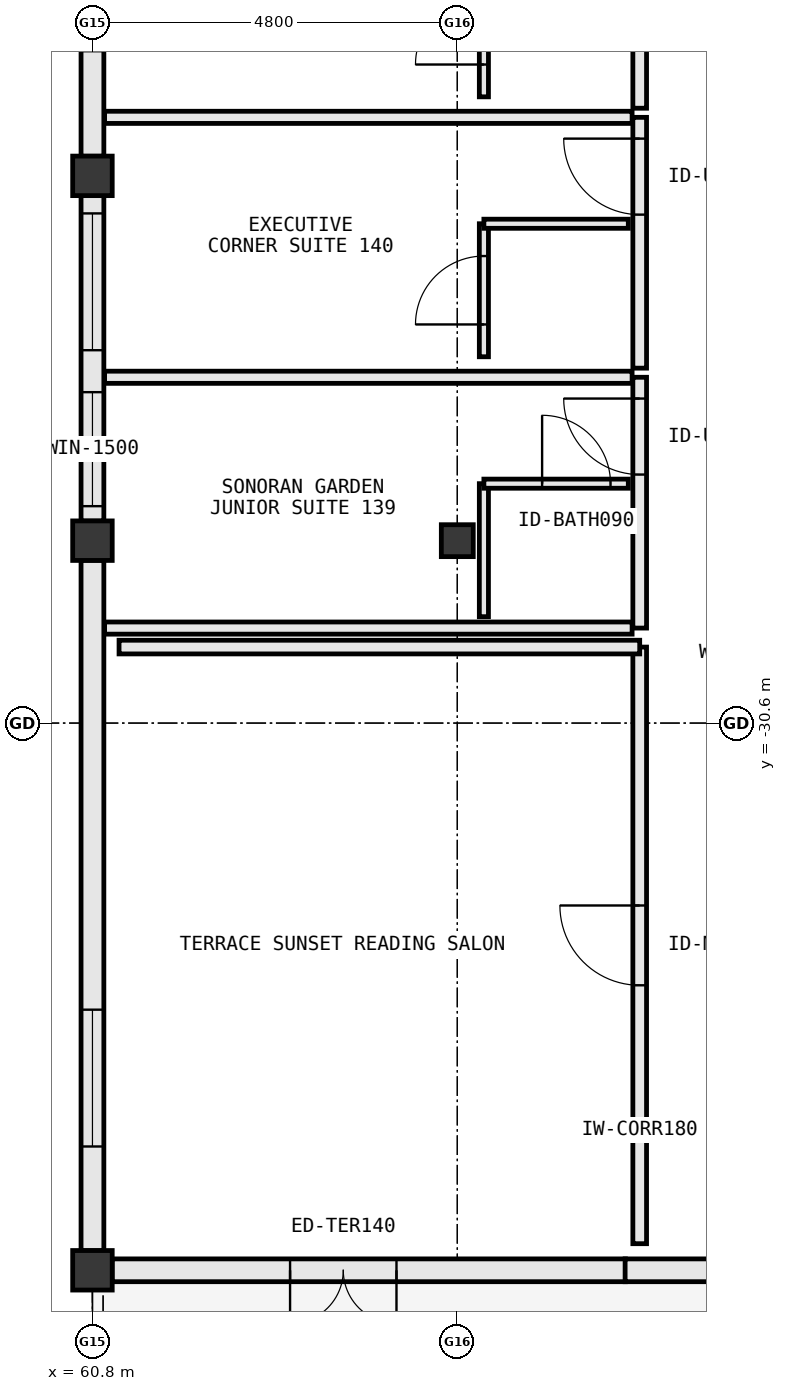
"""IFC4 building model, lengths in metres.
Left out: names, types, materials, properties, quantities, classifications, styles, units other than length and angle.
Written with IfcOpenShell. Run it as: python <this file> out.ifc"""

import sys

from ifc_helpers import new_model, si_unit, direction, frame, frame_2d, origin, origin_2d, place, context, subcontext, project, spatial, rectangle, extrude, element, fill, save


model = new_model("IFC4")
c1 = context("Model", 3, precision=1e-05, world=origin(), true_north=direction((0.0, 1.0)))
c2 = subcontext(c1, "Body", "Model", "MODEL_VIEW")
j1 = project(units=[si_unit("LENGTHUNIT", "METRE"), si_unit("PLANEANGLEUNIT", "RADIAN")], contexts=[c1])
p1 = place(None, origin())
s1 = spatial("IfcSite", under=j1, at=p1, CompositionType="ELEMENT")
p2 = place(p1, origin())
s2 = spatial("IfcBuilding", under=s1, at=p2, CompositionType="ELEMENT")
p3 = place(p2, frame((0.0, 0.0, 23.8)))
s3 = spatial("IfcBuildingStorey", under=s2, at=p3, CompositionType="ELEMENT", Elevation=23.8)
for number, where, z_axis, x_axis in (
    (1, (60.8, -37.8, 0.0), (0.0, 0.0, 1.0), (1.0, 0.0, 0.0)),
    (2, (60.8, -28.2, 0.0), (0.0, 0.0, 1.0), (1.0, 0.0, 0.0)),
    (3, (60.8, -23.4, 0.0), (0.0, 0.0, 1.0), (1.0, 0.0, 0.0)),
):
    element("IfcColumn", number, at=place(p3, frame(where, z_axis=z_axis, x_axis=x_axis)), inside=s3, PredefinedType="COLUMN", context=c2, shape_type="SweptSolid", body=[
        extrude(rectangle(XDim=0.52, YDim=0.52, at=origin_2d()), origin(), (0.0, 0.0, 1.0), 3.8),
    ])
p4 = place(p3, frame((65.6, -28.2, 0.0), z_axis=(0.0, 0.0, 1.0), x_axis=(1.0, 0.0, 0.0)))
e4 = element("IfcColumn", 4, at=p4, inside=s3, PredefinedType="COLUMN", context=c2, shape_type="SweptSolid", body=[
    extrude(rectangle(XDim=0.42, YDim=0.42, at=origin_2d()), origin(), (0.0, 0.0, 1.0), 3.8),
])
p5 = place(p3, frame((61.058, -37.8, 0.0), z_axis=(0.0, 0.0, 1.0), x_axis=(1.0, 0.0, 0.0)))
e5 = element("IfcWall", 5, at=p5, inside=s3, PredefinedType="STANDARD", context=c2, shape_type="SweptSolid", body=[
    extrude(rectangle(XDim=6.754, YDim=0.3, at=frame_2d((3.377, 0.0))), origin(), (0.0, 0.0, 1.0), 2.685),
])
p6 = place(p5, frame((2.342, 0.0, 0.0)))
e6 = element("IfcOpeningElement", 6, at=p6, cuts=e5, PredefinedType="OPENING", context=c2, shape_type="SweptSolid", body=[
    extrude(rectangle(XDim=1.4, YDim=2.2, at=frame_2d((0.7, 1.1))), frame((0.0, 0.162, 0.0), z_axis=(0.0, -1.0, 0.0), x_axis=(1.0, 0.0, 0.0)), (0.0, 0.0, 1.0), 0.324),
])
p7 = place(p3, frame((67.808, -37.8, 0.0), z_axis=(0.0, 0.0, 1.0), x_axis=(1.0, 0.0, 0.0)))
e7 = element("IfcWall", 7, at=p7, inside=s3, PredefinedType="STANDARD", context=c2, shape_type="SweptSolid", body=[
    extrude(rectangle(XDim=6.754, YDim=0.3, at=frame_2d((3.377, 0.0))), origin(), (0.0, 0.0, 1.0), 2.685),
])
p8 = place(p3, frame((60.8, -18.858, 0.0), z_axis=(0.0, 0.0, 1.0), x_axis=(0.0, -1.0, 0.0)))
e8 = element("IfcWall", 8, at=p8, inside=s3, PredefinedType="STANDARD", context=c2, shape_type="SweptSolid", body=[
    extrude(rectangle(XDim=4.284, YDim=0.3, at=frame_2d((2.142, 0.0))), origin(), (0.0, 0.0, 1.0), 3.005),
])
p9 = place(p8, frame((1.102, 0.0, 0.85)))
e9 = element("IfcOpeningElement", 9, at=p9, cuts=e8, PredefinedType="OPENING", context=c2, shape_type="SweptSolid", body=[
    extrude(rectangle(XDim=1.8, YDim=1.85, at=frame_2d((0.9, 0.925))), frame((0.0, 0.162, 0.0), z_axis=(0.0, -1.0, 0.0), x_axis=(1.0, 0.0, 0.0)), (0.0, 0.0, 1.0), 0.324),
])
p10 = place(p3, frame((60.8, -23.658, 0.0), z_axis=(0.0, 0.0, 1.0), x_axis=(0.0, -1.0, 0.0)))
e10 = element("IfcWall", 10, at=p10, inside=s3, PredefinedType="STANDARD", context=c2, shape_type="SweptSolid", body=[
    extrude(rectangle(XDim=4.284, YDim=0.3, at=frame_2d((2.142, 0.0))), origin(), (0.0, 0.0, 1.0), 3.005),
])
p11 = place(p10, frame((2.588, 0.0, 0.85)))
e11 = element("IfcOpeningElement", 11, at=p11, cuts=e10, PredefinedType="OPENING", context=c2, shape_type="SweptSolid", body=[
    extrude(rectangle(XDim=1.5, YDim=1.75, at=frame_2d((0.75, 0.875))), frame((0.0, 0.162, 0.0), z_axis=(0.0, -1.0, 0.0), x_axis=(1.0, 0.0, 0.0)), (0.0, 0.0, 1.0), 0.324),
])
p12 = place(p10, frame((0.236, 0.0, 0.85)))
e12 = element("IfcOpeningElement", 12, at=p12, cuts=e10, PredefinedType="OPENING", context=c2, shape_type="SweptSolid", body=[
    extrude(rectangle(XDim=1.8, YDim=1.85, at=frame_2d((0.9, 0.925))), frame((0.0, 0.162, 0.0), z_axis=(0.0, -1.0, 0.0), x_axis=(1.0, 0.0, 0.0)), (0.0, 0.0, 1.0), 0.324),
])
p13 = place(p3, frame((60.8, -28.458, 0.0), z_axis=(0.0, 0.0, 1.0), x_axis=(0.0, -1.0, 0.0)))
e13 = element("IfcWall", 13, at=p13, inside=s3, PredefinedType="STANDARD", context=c2, shape_type="SweptSolid", body=[
    extrude(rectangle(XDim=9.084, YDim=0.3, at=frame_2d((4.542, 0.0))), origin(), (0.0, 0.0, 1.0), 2.905),
])
p14 = place(p13, frame((5.913, 0.0, 0.85)))
e14 = element("IfcOpeningElement", 14, at=p14, cuts=e13, PredefinedType="OPENING", context=c2, shape_type="SweptSolid", body=[
    extrude(rectangle(XDim=1.8, YDim=1.85, at=frame_2d((0.9, 0.925))), frame((0.0, 0.162, 0.0), z_axis=(0.0, -1.0, 0.0), x_axis=(1.0, 0.0, 0.0)), (0.0, 0.0, 1.0), 0.324),
])
p15 = place(p3, frame((68.0, -37.45, 0.0), z_axis=(0.0, 0.0, 1.0), x_axis=(0.0, 1.0, 0.0)))
e15 = element("IfcWall", 15, at=p15, inside=s3, PredefinedType="PARTITIONING", context=c2, shape_type="SweptSolid", body=[
    extrude(rectangle(XDim=7.85, YDim=0.18, at=frame_2d((3.925, 0.0))), origin(), (0.0, 0.0, 1.0), 3.55),
])
p16 = place(p15, frame((3.4, 0.0, 0.0)))
e16 = element("IfcOpeningElement", 16, at=p16, cuts=e15, PredefinedType="OPENING", context=c2, shape_type="SweptSolid", body=[
    extrude(rectangle(XDim=1.05, YDim=2.2, at=frame_2d((0.525, 1.1))), frame((0.0, 0.102, 0.0), z_axis=(0.0, -1.0, 0.0), x_axis=(1.0, 0.0, 0.0)), (0.0, 0.0, 1.0), 0.204),
])
p17 = place(p3, frame((68.0, -29.6, 0.0), z_axis=(0.0, 0.0, 1.0), x_axis=(-1.0, 0.0, 0.0)))
e17 = element("IfcWall", 17, at=p17, inside=s3, PredefinedType="PARTITIONING", context=c2, shape_type="SweptSolid", body=[
    extrude(rectangle(XDim=6.85, YDim=0.18, at=frame_2d((3.425, 0.0))), origin(), (0.0, 0.0, 1.0), 3.55),
])
p18 = place(p3, frame((68.0, -29.35, 0.0), z_axis=(0.0, 0.0, 1.0), x_axis=(0.0, 1.0, 0.0)))
e18 = element("IfcWall", 18, at=p18, inside=s3, PredefinedType="PARTITIONING", context=c2, shape_type="SweptSolid", body=[
    extrude(rectangle(XDim=3.3, YDim=0.18, at=frame_2d((1.65, 0.0))), origin(), (0.0, 0.0, 1.0), 3.55),
])
p19 = place(p18, frame((2.02, 0.0, 0.0)))
e19 = element("IfcOpeningElement", 19, at=p19, cuts=e18, PredefinedType="OPENING", context=c2, shape_type="SweptSolid", body=[
    extrude(rectangle(XDim=1.0, YDim=2.2, at=frame_2d((0.5, 1.1))), frame((0.0, 0.102, 0.0), z_axis=(0.0, -1.0, 0.0), x_axis=(1.0, 0.0, 0.0)), (0.0, 0.0, 1.0), 0.204),
])
for number, where, z_axis, x_axis in (
    (20, (60.96, -29.35, 0.0), (0.0, 0.0, 1.0), (1.0, 0.0, 0.0)),
    (21, (60.96, -26.05, 0.0), (0.0, 0.0, 1.0), (1.0, 0.0, 0.0)),
):
    element("IfcWall", number, at=place(p3, frame(where, z_axis=z_axis, x_axis=x_axis)), inside=s3, PredefinedType="PARTITIONING", context=c2, shape_type="SweptSolid", body=[
        extrude(rectangle(XDim=6.94, YDim=0.16, at=frame_2d((3.47, 0.0))), origin(), (0.0, 0.0, 1.0), 3.55),
    ])
p20 = place(p3, frame((65.95, -29.2, 0.0), z_axis=(0.0, 0.0, 1.0), x_axis=(0.0, 1.0, 0.0)))
e22 = element("IfcWall", 22, at=p20, inside=s3, PredefinedType="PARTITIONING", context=c2, shape_type="SweptSolid", body=[
    extrude(rectangle(XDim=1.75, YDim=0.12, at=frame_2d((0.875, 0.0))), origin(), (0.0, 0.0, 1.0), 2.905),
])
p21 = place(p3, frame((65.95, -27.45, 0.0), z_axis=(0.0, 0.0, 1.0), x_axis=(1.0, 0.0, 0.0)))
e23 = element("IfcWall", 23, at=p21, inside=s3, PredefinedType="PARTITIONING", context=c2, shape_type="SweptSolid", body=[
    extrude(rectangle(XDim=1.9, YDim=0.12, at=frame_2d((0.95, 0.0))), origin(), (0.0, 0.0, 1.0), 3.55),
])
p22 = place(p21, frame((0.766, 0.0, 0.0)))
e24 = element("IfcOpeningElement", 24, at=p22, cuts=e23, PredefinedType="OPENING", context=c2, shape_type="SweptSolid", body=[
    extrude(rectangle(XDim=0.9, YDim=2.15, at=frame_2d((0.45, 1.075))), frame((0.0, 0.072, 0.0), z_axis=(0.0, -1.0, 0.0), x_axis=(1.0, 0.0, 0.0)), (0.0, 0.0, 1.0), 0.144),
])
p23 = place(p3, frame((68.0, -25.93, 0.0), z_axis=(0.0, 0.0, 1.0), x_axis=(0.0, 1.0, 0.0)))
e25 = element("IfcWall", 25, at=p23, inside=s3, PredefinedType="PARTITIONING", context=c2, shape_type="SweptSolid", body=[
    extrude(rectangle(XDim=3.3, YDim=0.18, at=frame_2d((1.65, 0.0))), origin(), (0.0, 0.0, 1.0), 3.55),
])
p24 = place(p23, frame((2.02, 0.0, 0.0)))
e26 = element("IfcOpeningElement", 26, at=p24, cuts=e25, PredefinedType="OPENING", context=c2, shape_type="SweptSolid", body=[
    extrude(rectangle(XDim=1.0, YDim=2.2, at=frame_2d((0.5, 1.1))), frame((0.0, 0.102, 0.0), z_axis=(0.0, -1.0, 0.0), x_axis=(1.0, 0.0, 0.0)), (0.0, 0.0, 1.0), 0.204),
])
p25 = place(p3, frame((60.96, -22.63, 0.0), z_axis=(0.0, 0.0, 1.0), x_axis=(1.0, 0.0, 0.0)))
e27 = element("IfcWall", 27, at=p25, inside=s3, PredefinedType="PARTITIONING", context=c2, shape_type="SweptSolid", body=[
    extrude(rectangle(XDim=6.94, YDim=0.16, at=frame_2d((3.47, 0.0))), origin(), (0.0, 0.0, 1.0), 3.55),
])
p26 = place(p3, frame((65.95, -25.78, 0.0), z_axis=(0.0, 0.0, 1.0), x_axis=(0.0, 1.0, 0.0)))
e28 = element("IfcWall", 28, at=p26, inside=s3, PredefinedType="PARTITIONING", context=c2, shape_type="SweptSolid", body=[
    extrude(rectangle(XDim=1.75, YDim=0.12, at=frame_2d((0.875, 0.0))), origin(), (0.0, 0.0, 1.0), 2.905),
])
p27 = place(p26, frame((0.425, 0.0, 0.0)))
e29 = element("IfcOpeningElement", 29, at=p27, cuts=e28, PredefinedType="OPENING", context=c2, shape_type="SweptSolid", body=[
    extrude(rectangle(XDim=0.9, YDim=2.15, at=frame_2d((0.45, 1.075))), frame((0.0, 0.072, 0.0), z_axis=(0.0, -1.0, 0.0), x_axis=(1.0, 0.0, 0.0)), (0.0, 0.0, 1.0), 0.144),
])
p28 = place(p3, frame((65.95, -24.03, 0.0), z_axis=(0.0, 0.0, 1.0), x_axis=(1.0, 0.0, 0.0)))
e30 = element("IfcWall", 30, at=p28, inside=s3, PredefinedType="PARTITIONING", context=c2, shape_type="SweptSolid", body=[
    extrude(rectangle(XDim=1.9, YDim=0.12, at=frame_2d((0.95, 0.0))), origin(), (0.0, 0.0, 1.0), 3.55),
])
p29 = place(p3, frame((68.0, -22.51, 0.0), z_axis=(0.0, 0.0, 1.0), x_axis=(0.0, 1.0, 0.0)))
e31 = element("IfcWall", 31, at=p29, inside=s3, PredefinedType="PARTITIONING", context=c2, shape_type="SweptSolid", body=[
    extrude(rectangle(XDim=3.3, YDim=0.18, at=frame_2d((1.65, 0.0))), origin(), (0.0, 0.0, 1.0), 3.55),
])
p30 = place(p29, frame((2.02, 0.0, 0.0)))
e32 = element("IfcOpeningElement", 32, at=p30, cuts=e31, PredefinedType="OPENING", context=c2, shape_type="SweptSolid", body=[
    extrude(rectangle(XDim=1.0, YDim=2.2, at=frame_2d((0.5, 1.1))), frame((0.0, 0.102, 0.0), z_axis=(0.0, -1.0, 0.0), x_axis=(1.0, 0.0, 0.0)), (0.0, 0.0, 1.0), 0.204),
])
p31 = place(p3, frame((65.95, -22.36, 0.0), z_axis=(0.0, 0.0, 1.0), x_axis=(0.0, 1.0, 0.0)))
e33 = element("IfcWall", 33, at=p31, inside=s3, PredefinedType="PARTITIONING", context=c2, shape_type="SweptSolid", body=[
    extrude(rectangle(XDim=1.75, YDim=0.12, at=frame_2d((0.875, 0.0))), origin(), (0.0, 0.0, 1.0), 2.905),
])
p32 = place(p31, frame((0.425, 0.0, 0.0)))
e34 = element("IfcOpeningElement", 34, at=p32, cuts=e33, PredefinedType="OPENING", context=c2, shape_type="SweptSolid", body=[
    extrude(rectangle(XDim=0.9, YDim=2.15, at=frame_2d((0.45, 1.075))), frame((0.0, 0.072, 0.0), z_axis=(0.0, -1.0, 0.0), x_axis=(1.0, 0.0, 0.0)), (0.0, 0.0, 1.0), 0.144),
])
p33 = place(p6, frame((1.4, 0.0, 0.0), z_axis=(0.0, 0.0, 1.0), x_axis=(-1.0, 0.0, 0.0)))
e35 = element("IfcDoor", 35, at=p33, inside=s3, OperationType="DOUBLE_DOOR_SINGLE_SWING", PredefinedType="DOOR", context=c2, shape_type="SweptSolid", body=[
    extrude(rectangle(XDim=1.4, YDim=2.2, at=frame_2d((0.7, 1.1))), frame((0.0, 0.025, 0.0), z_axis=(0.0, -1.0, 0.0), x_axis=(1.0, 0.0, 0.0)), (0.0, 0.0, 1.0), 0.05),
])
fill(e6, e35)
p34 = place(p14, origin())
e36 = element("IfcWindow", 36, at=p34, inside=s3, PartitioningType="SINGLE_PANEL", PredefinedType="WINDOW", context=c2, shape_type="SweptSolid", body=[
    extrude(rectangle(XDim=1.8, YDim=1.85, at=frame_2d((0.9, 0.925))), frame((0.0, 0.03, 0.0), z_axis=(0.0, -1.0, 0.0), x_axis=(1.0, 0.0, 0.0)), (0.0, 0.0, 1.0), 0.06),
])
fill(e14, e36)
p35 = place(p11, origin())
e37 = element("IfcWindow", 37, at=p35, inside=s3, PartitioningType="SINGLE_PANEL", PredefinedType="WINDOW", context=c2, shape_type="SweptSolid", body=[
    extrude(rectangle(XDim=1.5, YDim=1.75, at=frame_2d((0.75, 0.875))), frame((0.0, 0.03, 0.0), z_axis=(0.0, -1.0, 0.0), x_axis=(1.0, 0.0, 0.0)), (0.0, 0.0, 1.0), 0.06),
])
fill(e11, e37)
p36 = place(p12, origin())
e38 = element("IfcWindow", 38, at=p36, inside=s3, PartitioningType="SINGLE_PANEL", PredefinedType="WINDOW", context=c2, shape_type="SweptSolid", body=[
    extrude(rectangle(XDim=1.8, YDim=1.85, at=frame_2d((0.9, 0.925))), frame((0.0, 0.03, 0.0), z_axis=(0.0, -1.0, 0.0), x_axis=(1.0, 0.0, 0.0)), (0.0, 0.0, 1.0), 0.06),
])
fill(e12, e38)
p37 = place(p16, origin())
e39 = element("IfcDoor", 39, at=p37, inside=s3, OperationType="SINGLE_SWING_RIGHT", PredefinedType="DOOR", context=c2, shape_type="SweptSolid", body=[
    extrude(rectangle(XDim=1.05, YDim=2.2, at=frame_2d((0.525, 1.1))), frame((0.0, 0.025, 0.0), z_axis=(0.0, -1.0, 0.0), x_axis=(1.0, 0.0, 0.0)), (0.0, 0.0, 1.0), 0.05),
])
fill(e16, e39)
p38 = place(p19, origin())
e40 = element("IfcDoor", 40, at=p38, inside=s3, OperationType="SINGLE_SWING_RIGHT", PredefinedType="DOOR", context=c2, shape_type="SweptSolid", body=[
    extrude(rectangle(XDim=1.0, YDim=2.2, at=frame_2d((0.5, 1.1))), frame((0.0, 0.025, 0.0), z_axis=(0.0, -1.0, 0.0), x_axis=(1.0, 0.0, 0.0)), (0.0, 0.0, 1.0), 0.05),
])
fill(e19, e40)
p39 = place(p22, origin())
e41 = element("IfcDoor", 41, at=p39, inside=s3, OperationType="SINGLE_SWING_LEFT", PredefinedType="DOOR", context=c2, shape_type="SweptSolid", body=[
    extrude(rectangle(XDim=0.9, YDim=2.15, at=frame_2d((0.45, 1.075))), frame((0.0, 0.025, 0.0), z_axis=(0.0, -1.0, 0.0), x_axis=(1.0, 0.0, 0.0)), (0.0, 0.0, 1.0), 0.05),
])
fill(e24, e41)
p40 = place(p24, origin())
e42 = element("IfcDoor", 42, at=p40, inside=s3, OperationType="SINGLE_SWING_RIGHT", PredefinedType="DOOR", context=c2, shape_type="SweptSolid", body=[
    extrude(rectangle(XDim=1.0, YDim=2.2, at=frame_2d((0.5, 1.1))), frame((0.0, 0.025, 0.0), z_axis=(0.0, -1.0, 0.0), x_axis=(1.0, 0.0, 0.0)), (0.0, 0.0, 1.0), 0.05),
])
fill(e26, e42)
p41 = place(p27, origin())
e43 = element("IfcDoor", 43, at=p41, inside=s3, OperationType="SINGLE_SWING_LEFT", PredefinedType="DOOR", context=c2, shape_type="SweptSolid", body=[
    extrude(rectangle(XDim=0.9, YDim=2.15, at=frame_2d((0.45, 1.075))), frame((0.0, 0.025, 0.0), z_axis=(0.0, -1.0, 0.0), x_axis=(1.0, 0.0, 0.0)), (0.0, 0.0, 1.0), 0.05),
])
fill(e29, e43)
p42 = place(p32, origin())
e44 = element("IfcDoor", 44, at=p42, inside=s3, OperationType="SINGLE_SWING_LEFT", PredefinedType="DOOR", context=c2, shape_type="SweptSolid", body=[
    extrude(rectangle(XDim=0.9, YDim=2.15, at=frame_2d((0.45, 1.075))), frame((0.0, 0.025, 0.0), z_axis=(0.0, -1.0, 0.0), x_axis=(1.0, 0.0, 0.0)), (0.0, 0.0, 1.0), 0.05),
])
fill(e34, e44)
save(model, sys.argv[1])
